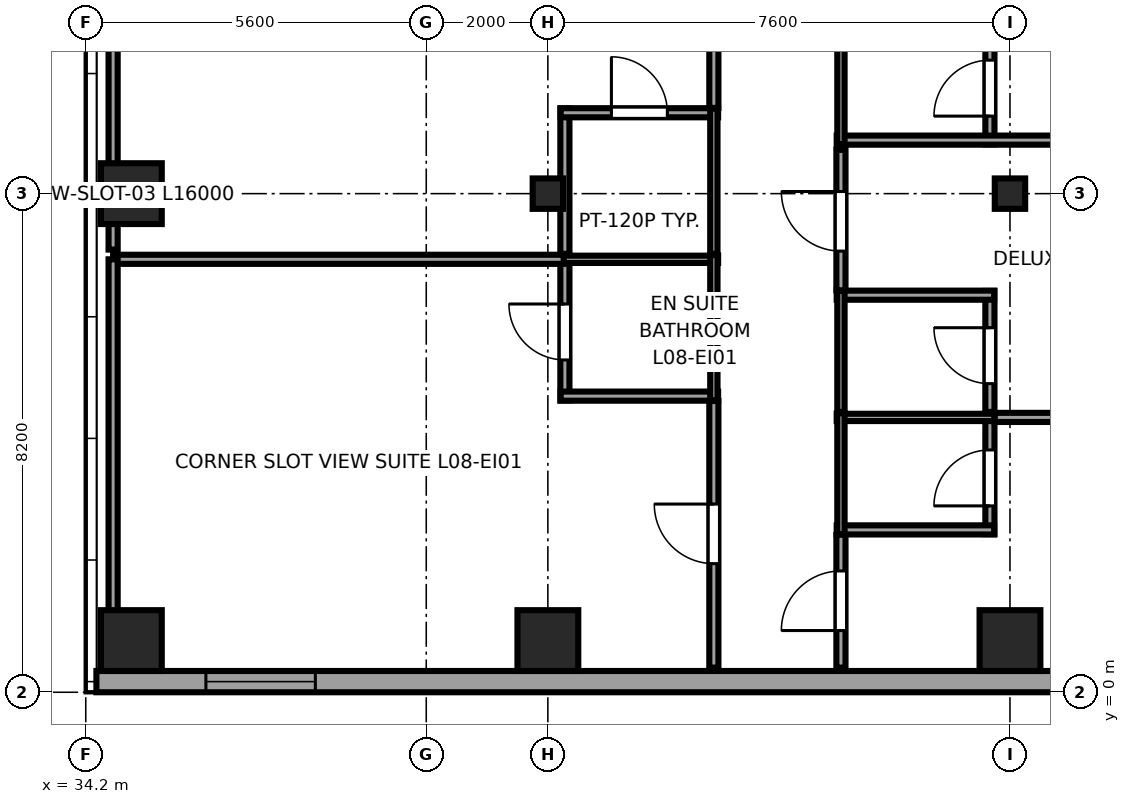
"""IFC4 building model, lengths in metres.
Left out: names, types, materials, properties, quantities, classifications, styles, units other than length and angle.
Written with IfcOpenShell. Run it as: python <this file> out.ifc"""

import sys

from ifc_helpers import new_model, si_unit, direction, frame, frame_2d, origin, origin_2d, place, context, subcontext, project, spatial, rectangle, i_section, extrude, source, transform, mapped, element, fill, save


model = new_model("IFC4")
c1 = context("Model", 3, precision=1e-05, world=origin(), true_north=direction((0.0, 1.0)))
c2 = subcontext(c1, "Body", "Model", "MODEL_VIEW")
j1 = project(units=[si_unit("LENGTHUNIT", "METRE"), si_unit("PLANEANGLEUNIT", "RADIAN")], contexts=[c1])
p1 = place(None, origin())
s1 = spatial("IfcSite", under=j1, at=p1, CompositionType="ELEMENT")
p2 = place(p1, origin())
s2 = spatial("IfcBuilding", under=s1, at=p2, CompositionType="ELEMENT")
p3 = place(p2, frame((0.0, 0.0, 39.1)))
s3 = spatial("IfcBuildingStorey", under=s2, at=p3, CompositionType="ELEMENT", Elevation=39.1)
m1 = source(origin(), c2, "Body", "SweptSolid", [
    extrude(rectangle(XDim=1.0, YDim=1.0, at=origin_2d()), origin(), (0.0, 0.0, 1.0), 3.55),
])
for number, where, z_axis, x_axis in (
    (1, (34.95, 0.85, 0.0), (0.0, 0.0, 1.0), (1.0, 0.0, 0.0)),
    (2, (34.95, 8.2, 0.0), (0.0, 0.0, 1.0), (1.0, 0.0, 0.0)),
    (3, (41.8, 0.85, 0.0), (0.0, 0.0, 1.0), (1.0, 0.0, 0.0)),
):
    element("IfcColumn", number, at=place(p3, frame(where, z_axis=z_axis, x_axis=x_axis)), inside=s3, PredefinedType="COLUMN", context=c2, shape_type="MappedRepresentation", body=[
        mapped(m1, transform((0.0, 0.0, 0.0), x_axis=(1.0, 0.0, 0.0), y_axis=(0.0, 1.0, 0.0), z_axis=(0.0, 0.0, 1.0), scale=1.0)),
    ])
m2 = source(origin(), c2, "Body", "SweptSolid", [
    extrude(i_section(OverallWidth=0.5, OverallDepth=0.5, WebThickness=0.028, FlangeThickness=0.045, at=origin_2d()), origin(), (0.0, 0.0, 1.0), 3.55),
])
p4 = place(p3, frame((41.8, 8.2, 0.0), z_axis=(0.0, 0.0, 1.0), x_axis=(1.0, 0.0, 0.0)))
e4 = element("IfcColumn", 4, at=p4, inside=s3, PredefinedType="COLUMN", context=c2, shape_type="MappedRepresentation", body=[
    mapped(m2, transform((0.0, 0.0, 0.0), x_axis=(1.0, 0.0, 0.0), y_axis=(0.0, 1.0, 0.0), z_axis=(0.0, 0.0, 1.0), scale=1.0)),
])
p5 = place(p3, frame((49.4, 0.85, 0.0), z_axis=(0.0, 0.0, 1.0), x_axis=(1.0, 0.0, 0.0)))
e5 = element("IfcColumn", 5, at=p5, inside=s3, PredefinedType="COLUMN", context=c2, shape_type="MappedRepresentation", body=[
    mapped(m1, transform((0.0, 0.0, 0.0), x_axis=(1.0, 0.0, 0.0), y_axis=(0.0, 1.0, 0.0), z_axis=(0.0, 0.0, 1.0), scale=1.0)),
])
p6 = place(p3, frame((49.4, 8.2, 0.0), z_axis=(0.0, 0.0, 1.0), x_axis=(1.0, 0.0, 0.0)))
e6 = element("IfcColumn", 6, at=p6, inside=s3, PredefinedType="COLUMN", context=c2, shape_type="MappedRepresentation", body=[
    mapped(m2, transform((0.0, 0.0, 0.0), x_axis=(1.0, 0.0, 0.0), y_axis=(0.0, 1.0, 0.0), z_axis=(0.0, 0.0, 1.0), scale=1.0)),
])
p7 = place(p3, frame((34.375, 0.175, 0.0), z_axis=(0.0, 0.0, 1.0), x_axis=(1.0, 0.0, 0.0)))
e7 = element("IfcWall", 7, at=p7, inside=s3, PredefinedType="SOLIDWALL", context=c2, shape_type="SweptSolid", body=[
    extrude(rectangle(XDim=18.008, YDim=0.35, at=frame_2d((9.004, 0.0))), origin(), (0.0, 0.0, 1.0), 3.37),
])
p8 = place(p7, frame((1.801, 0.0, 0.68)))
e8 = element("IfcOpeningElement", 8, at=p8, cuts=e7, PredefinedType="OPENING", context=c2, shape_type="SweptSolid", body=[
    extrude(rectangle(XDim=1.8, YDim=1.85, at=frame_2d((0.9, 0.925))), frame((0.0, 0.185, 0.0), z_axis=(0.0, -1.0, 0.0), x_axis=(1.0, 0.0, 0.0)), (0.0, 0.0, 1.0), 0.37),
])
p9 = place(p7, frame((15.725, 0.0, 0.62)))
e9 = element("IfcOpeningElement", 9, at=p9, cuts=e7, PredefinedType="OPENING", context=c2, shape_type="SweptSolid", body=[
    extrude(rectangle(XDim=1.5, YDim=1.55, at=frame_2d((0.75, 0.775))), frame((0.0, 0.185, 0.0), z_axis=(0.0, -1.0, 0.0), x_axis=(1.0, 0.0, 0.0)), (0.0, 0.0, 1.0), 0.37),
])
p10 = place(p3, frame((42.08, 4.8, 0.0), z_axis=(0.0, 0.0, 1.0), x_axis=(0.0, 1.0, 0.0)))
e10 = element("IfcWall", 10, at=p10, inside=s3, PredefinedType="PARTITIONING", context=c2, shape_type="SweptSolid", body=[
    extrude(rectangle(XDim=2.39, YDim=0.15, at=frame_2d((1.195, 0.0))), origin(), (0.0, 0.0, 1.0), 3.37),
])
p11 = place(p10, frame((0.665, 0.0, 0.0)))
e11 = element("IfcOpeningElement", 11, at=p11, cuts=e10, PredefinedType="OPENING", context=c2, shape_type="SweptSolid", body=[
    extrude(rectangle(XDim=0.92, YDim=2.01, at=frame_2d((0.46, 1.005))), frame((0.0, 0.085, 0.0), z_axis=(0.0, -1.0, 0.0), x_axis=(1.0, 0.0, 0.0)), (0.0, 0.0, 1.0), 0.17),
])
p12 = place(p3, frame((42.01, 4.87, 0.0), z_axis=(0.0, 0.0, 1.0), x_axis=(1.0, 0.0, 0.0)))
e12 = element("IfcWall", 12, at=p12, inside=s3, PredefinedType="PARTITIONING", context=c2, shape_type="SweptSolid", body=[
    extrude(rectangle(XDim=2.59, YDim=0.15, at=frame_2d((1.295, 0.0))), origin(), (0.0, 0.0, 1.0), 3.37),
])
p13 = place(p3, frame((42.01, 7.12, 0.0), z_axis=(0.0, 0.0, 1.0), x_axis=(1.0, 0.0, 0.0)))
e13 = element("IfcWall", 13, at=p13, inside=s3, PredefinedType="PLUMBINGWALL", context=c2, shape_type="SweptSolid", body=[
    extrude(rectangle(XDim=2.59, YDim=0.12, at=frame_2d((1.295, 0.0))), origin(), (0.0, 0.0, 1.0), 3.37),
])
p14 = place(p3, frame((44.53, 4.8, 0.0), z_axis=(0.0, 0.0, 1.0), x_axis=(0.0, 1.0, 0.0)))
e14 = element("IfcWall", 14, at=p14, inside=s3, PredefinedType="PLUMBINGWALL", context=c2, shape_type="SweptSolid", body=[
    extrude(rectangle(XDim=2.39, YDim=0.12, at=frame_2d((1.195, 0.0))), origin(), (0.0, 0.0, 1.0), 3.37),
])
p15 = place(p3, frame((42.08, 7.21, 0.0), z_axis=(0.0, 0.0, 1.0), x_axis=(0.0, 1.0, 0.0)))
e15 = element("IfcWall", 15, at=p15, inside=s3, PredefinedType="PARTITIONING", context=c2, shape_type="SweptSolid", body=[
    extrude(rectangle(XDim=2.39, YDim=0.15, at=frame_2d((1.195, 0.0))), origin(), (0.0, 0.0, 1.0), 3.37),
])
p16 = place(p3, frame((42.01, 9.53, 0.0), z_axis=(0.0, 0.0, 1.0), x_axis=(1.0, 0.0, 0.0)))
e16 = element("IfcWall", 16, at=p16, inside=s3, PredefinedType="PARTITIONING", context=c2, shape_type="SweptSolid", body=[
    extrude(rectangle(XDim=2.59, YDim=0.15, at=frame_2d((1.295, 0.0))), origin(), (0.0, 0.0, 1.0), 3.37),
])
p17 = place(p16, frame((0.835, 0.0, 0.0)))
e17 = element("IfcOpeningElement", 17, at=p17, cuts=e16, PredefinedType="OPENING", context=c2, shape_type="SweptSolid", body=[
    extrude(rectangle(XDim=0.92, YDim=2.01, at=frame_2d((0.46, 1.005))), frame((0.0, 0.085, 0.0), z_axis=(0.0, -1.0, 0.0), x_axis=(1.0, 0.0, 0.0)), (0.0, 0.0, 1.0), 0.17),
])
p18 = place(p3, frame((44.53, 7.21, 0.0), z_axis=(0.0, 0.0, 1.0), x_axis=(0.0, 1.0, 0.0)))
e18 = element("IfcWall", 18, at=p18, inside=s3, PredefinedType="PLUMBINGWALL", context=c2, shape_type="SweptSolid", body=[
    extrude(rectangle(XDim=2.39, YDim=0.12, at=frame_2d((1.195, 0.0))), origin(), (0.0, 0.0, 1.0), 3.37),
])
p19 = place(p3, frame((49.07, 2.6, 0.0), z_axis=(0.0, 0.0, 1.0), x_axis=(0.0, 1.0, 0.0)))
e19 = element("IfcWall", 19, at=p19, inside=s3, PredefinedType="PARTITIONING", context=c2, shape_type="SweptSolid", body=[
    extrude(rectangle(XDim=1.99, YDim=0.15, at=frame_2d((0.995, 0.0))), origin(), (0.0, 0.0, 1.0), 3.37),
])
p20 = place(p19, frame((0.465, 0.0, 0.0)))
e20 = element("IfcOpeningElement", 20, at=p20, cuts=e19, PredefinedType="OPENING", context=c2, shape_type="SweptSolid", body=[
    extrude(rectangle(XDim=0.92, YDim=2.01, at=frame_2d((0.46, 1.005))), frame((0.0, 0.085, 0.0), z_axis=(0.0, -1.0, 0.0), x_axis=(1.0, 0.0, 0.0)), (0.0, 0.0, 1.0), 0.17),
])
p21 = place(p3, frame((46.55, 2.67, 0.0), z_axis=(0.0, 0.0, 1.0), x_axis=(1.0, 0.0, 0.0)))
e21 = element("IfcWall", 21, at=p21, inside=s3, PredefinedType="PARTITIONING", context=c2, shape_type="SweptSolid", body=[
    extrude(rectangle(XDim=2.59, YDim=0.15, at=frame_2d((1.295, 0.0))), origin(), (0.0, 0.0, 1.0), 3.37),
])
p22 = place(p3, frame((46.55, 4.52, 0.0), z_axis=(0.0, 0.0, 1.0), x_axis=(1.0, 0.0, 0.0)))
e22 = element("IfcWall", 22, at=p22, inside=s3, PredefinedType="PLUMBINGWALL", context=c2, shape_type="SweptSolid", body=[
    extrude(rectangle(XDim=2.59, YDim=0.12, at=frame_2d((1.295, 0.0))), origin(), (0.0, 0.0, 1.0), 3.37),
])
p23 = place(p3, frame((46.62, 2.6, 0.0), z_axis=(0.0, 0.0, 1.0), x_axis=(0.0, 1.0, 0.0)))
e23 = element("IfcWall", 23, at=p23, inside=s3, PredefinedType="PLUMBINGWALL", context=c2, shape_type="SweptSolid", body=[
    extrude(rectangle(XDim=1.99, YDim=0.12, at=frame_2d((0.995, 0.0))), origin(), (0.0, 0.0, 1.0), 3.37),
])
p24 = place(p3, frame((49.07, 4.61, 0.0), z_axis=(0.0, 0.0, 1.0), x_axis=(0.0, 1.0, 0.0)))
e24 = element("IfcWall", 24, at=p24, inside=s3, PredefinedType="PARTITIONING", context=c2, shape_type="SweptSolid", body=[
    extrude(rectangle(XDim=1.99, YDim=0.15, at=frame_2d((0.995, 0.0))), origin(), (0.0, 0.0, 1.0), 3.37),
])
p25 = place(p24, frame((0.465, 0.0, 0.0)))
e25 = element("IfcOpeningElement", 25, at=p25, cuts=e24, PredefinedType="OPENING", context=c2, shape_type="SweptSolid", body=[
    extrude(rectangle(XDim=0.92, YDim=2.01, at=frame_2d((0.46, 1.005))), frame((0.0, 0.085, 0.0), z_axis=(0.0, -1.0, 0.0), x_axis=(1.0, 0.0, 0.0)), (0.0, 0.0, 1.0), 0.17),
])
p26 = place(p3, frame((46.55, 6.53, 0.0), z_axis=(0.0, 0.0, 1.0), x_axis=(1.0, 0.0, 0.0)))
e26 = element("IfcWall", 26, at=p26, inside=s3, PredefinedType="PARTITIONING", context=c2, shape_type="SweptSolid", body=[
    extrude(rectangle(XDim=2.59, YDim=0.15, at=frame_2d((1.295, 0.0))), origin(), (0.0, 0.0, 1.0), 3.37),
])
p27 = place(p3, frame((46.62, 4.61, 0.0), z_axis=(0.0, 0.0, 1.0), x_axis=(0.0, 1.0, 0.0)))
e27 = element("IfcWall", 27, at=p27, inside=s3, PredefinedType="PLUMBINGWALL", context=c2, shape_type="SweptSolid", body=[
    extrude(rectangle(XDim=1.99, YDim=0.12, at=frame_2d((0.995, 0.0))), origin(), (0.0, 0.0, 1.0), 3.37),
])
p28 = place(p3, frame((49.07, 9.01, 0.0), z_axis=(0.0, 0.0, 1.0), x_axis=(0.0, 1.0, 0.0)))
e28 = element("IfcWall", 28, at=p28, inside=s3, PredefinedType="PARTITIONING", context=c2, shape_type="SweptSolid", body=[
    extrude(rectangle(XDim=1.99, YDim=0.15, at=frame_2d((0.995, 0.0))), origin(), (0.0, 0.0, 1.0), 3.37),
])
p29 = place(p28, frame((0.465, 0.0, 0.0)))
e29 = element("IfcOpeningElement", 29, at=p29, cuts=e28, PredefinedType="OPENING", context=c2, shape_type="SweptSolid", body=[
    extrude(rectangle(XDim=0.92, YDim=2.01, at=frame_2d((0.46, 1.005))), frame((0.0, 0.085, 0.0), z_axis=(0.0, -1.0, 0.0), x_axis=(1.0, 0.0, 0.0)), (0.0, 0.0, 1.0), 0.17),
])
p30 = place(p3, frame((46.55, 9.08, 0.0), z_axis=(0.0, 0.0, 1.0), x_axis=(1.0, 0.0, 0.0)))
e30 = element("IfcWall", 30, at=p30, inside=s3, PredefinedType="PARTITIONING", context=c2, shape_type="SweptSolid", body=[
    extrude(rectangle(XDim=10.045, YDim=0.15, at=frame_2d((5.022, 0.0))), origin(), (0.0, 0.0, 1.0), 3.37),
])
p31 = place(p3, frame((46.62, 9.01, 0.0), z_axis=(0.0, 0.0, 1.0), x_axis=(0.0, 1.0, 0.0)))
e31 = element("IfcWall", 31, at=p31, inside=s3, PredefinedType="PLUMBINGWALL", context=c2, shape_type="SweptSolid", body=[
    extrude(rectangle(XDim=1.99, YDim=0.12, at=frame_2d((0.995, 0.0))), origin(), (0.0, 0.0, 1.0), 3.37),
])
p32 = place(p3, frame((44.53, 0.405, 0.0), z_axis=(0.0, 0.0, 1.0), x_axis=(0.0, 1.0, 0.0)))
e32 = element("IfcWall", 32, at=p32, inside=s3, PredefinedType="PARTITIONING", context=c2, shape_type="SweptSolid", body=[
    extrude(rectangle(XDim=4.385, YDim=0.15, at=frame_2d((2.192, 0.0))), origin(), (0.0, 0.0, 1.0), 3.37),
])
p33 = place(p32, frame((1.71, 0.0, 0.0)))
e33 = element("IfcOpeningElement", 33, at=p33, cuts=e32, PredefinedType="OPENING", context=c2, shape_type="SweptSolid", body=[
    extrude(rectangle(XDim=0.98, YDim=2.12, at=frame_2d((0.49, 1.06))), frame((0.0, 0.085, 0.0), z_axis=(0.0, -1.0, 0.0), x_axis=(1.0, 0.0, 0.0)), (0.0, 0.0, 1.0), 0.17),
])
p34 = place(p3, frame((34.65, 7.12, 0.0), z_axis=(0.0, 0.0, 1.0), x_axis=(1.0, 0.0, 0.0)))
e34 = element("IfcWall", 34, at=p34, inside=s3, PredefinedType="PARTITIONING", context=c2, shape_type="SweptSolid", body=[
    extrude(rectangle(XDim=7.41, YDim=0.15, at=frame_2d((3.705, 0.0))), origin(), (0.0, 0.0, 1.0), 3.37),
])
p35 = place(p3, frame((34.65, 0.405, 0.0), z_axis=(0.0, 0.0, 1.0), x_axis=(0.0, 1.0, 0.0)))
e35 = element("IfcWall", 35, at=p35, inside=s3, PredefinedType="PARTITIONING", context=c2, shape_type="SweptSolid", body=[
    extrude(rectangle(XDim=6.715, YDim=0.15, at=frame_2d((3.357, 0.0))), origin(), (0.0, 0.0, 1.0), 3.37),
])
p36 = place(p3, frame((44.53, 9.61, 0.0), z_axis=(0.0, 0.0, 1.0), x_axis=(0.0, 1.0, 0.0)))
e36 = element("IfcWall", 36, at=p36, inside=s3, PredefinedType="PARTITIONING", context=c2, shape_type="SweptSolid", body=[
    extrude(rectangle(XDim=4.51, YDim=0.15, at=frame_2d((2.255, 0.0))), origin(), (0.0, 0.0, 1.0), 3.37),
])
p37 = place(p36, frame((1.745, 0.0, 0.0)))
e37 = element("IfcOpeningElement", 37, at=p37, cuts=e36, PredefinedType="OPENING", context=c2, shape_type="SweptSolid", body=[
    extrude(rectangle(XDim=0.98, YDim=2.12, at=frame_2d((0.49, 1.06))), frame((0.0, 0.085, 0.0), z_axis=(0.0, -1.0, 0.0), x_axis=(1.0, 0.0, 0.0)), (0.0, 0.0, 1.0), 0.17),
])
p38 = place(p3, frame((34.65, 7.28, 0.0), z_axis=(0.0, 0.0, 1.0), x_axis=(0.0, 1.0, 0.0)))
e38 = element("IfcWall", 38, at=p38, inside=s3, PredefinedType="PARTITIONING", context=c2, shape_type="SweptSolid", body=[
    extrude(rectangle(XDim=6.84, YDim=0.15, at=frame_2d((3.42, 0.0))), origin(), (0.0, 0.0, 1.0), 3.37),
])
p39 = place(p3, frame((46.62, 0.405, 0.0), z_axis=(0.0, 0.0, 1.0), x_axis=(0.0, 1.0, 0.0)))
e39 = element("IfcWall", 39, at=p39, inside=s3, PredefinedType="PARTITIONING", context=c2, shape_type="SweptSolid", body=[
    extrude(rectangle(XDim=2.185, YDim=0.15, at=frame_2d((1.093, 0.0))), origin(), (0.0, 0.0, 1.0), 3.37),
])
p40 = place(p39, frame((0.61, 0.0, 0.0)))
e40 = element("IfcOpeningElement", 40, at=p40, cuts=e39, PredefinedType="OPENING", context=c2, shape_type="SweptSolid", body=[
    extrude(rectangle(XDim=0.98, YDim=2.12, at=frame_2d((0.49, 1.06))), frame((0.0, 0.085, 0.0), z_axis=(0.0, -1.0, 0.0), x_axis=(1.0, 0.0, 0.0)), (0.0, 0.0, 1.0), 0.17),
])
p41 = place(p3, frame((49.15, 4.52, 0.0), z_axis=(0.0, 0.0, 1.0), x_axis=(1.0, 0.0, 0.0)))
e41 = element("IfcWall", 41, at=p41, inside=s3, PredefinedType="PARTITIONING", context=c2, shape_type="SweptSolid", body=[
    extrude(rectangle(XDim=7.445, YDim=0.15, at=frame_2d((3.723, 0.0))), origin(), (0.0, 0.0, 1.0), 3.37),
])
p42 = place(p3, frame((46.62, 6.61, 0.0), z_axis=(0.0, 0.0, 1.0), x_axis=(0.0, 1.0, 0.0)))
e42 = element("IfcWall", 42, at=p42, inside=s3, PredefinedType="PARTITIONING", context=c2, shape_type="SweptSolid", body=[
    extrude(rectangle(XDim=2.31, YDim=0.15, at=frame_2d((1.155, 0.0))), origin(), (0.0, 0.0, 1.0), 3.37),
])
p43 = place(p42, frame((0.645, 0.0, 0.0)))
e43 = element("IfcOpeningElement", 43, at=p43, cuts=e42, PredefinedType="OPENING", context=c2, shape_type="SweptSolid", body=[
    extrude(rectangle(XDim=0.98, YDim=2.12, at=frame_2d((0.49, 1.06))), frame((0.0, 0.085, 0.0), z_axis=(0.0, -1.0, 0.0), x_axis=(1.0, 0.0, 0.0)), (0.0, 0.0, 1.0), 0.17),
])
m3 = source(origin(), c2, "Body", "SweptSolid", [
    extrude(rectangle(XDim=1.8, YDim=1.85, at=frame_2d((0.9, 0.925))), frame((0.0, 0.09, 0.0), z_axis=(0.0, -1.0, 0.0), x_axis=(1.0, 0.0, 0.0)), (0.0, 0.0, 1.0), 0.06),
])
p44 = place(p8, origin())
e44 = element("IfcWindow", 44, at=p44, inside=s3, PartitioningType="TRIPLE_PANEL_HORIZONTAL", PredefinedType="WINDOW", context=c2, shape_type="MappedRepresentation", body=[
    mapped(m3, transform((0.0, 0.0, 0.0), x_axis=(1.0, 0.0, 0.0), y_axis=(0.0, 1.0, 0.0), z_axis=(0.0, 0.0, 1.0), scale=1.0)),
])
fill(e8, e44)
m4 = source(origin(), c2, "Body", "SweptSolid", [
    extrude(rectangle(XDim=0.92, YDim=2.01, at=frame_2d((0.46, 1.005))), frame((0.0, 0.025, 0.0), z_axis=(0.0, -1.0, 0.0), x_axis=(1.0, 0.0, 0.0)), (0.0, 0.0, 1.0), 0.05),
])
p45 = place(p11, origin())
e45 = element("IfcDoor", 45, at=p45, inside=s3, OperationType="SINGLE_SWING_RIGHT", PredefinedType="DOOR", context=c2, shape_type="MappedRepresentation", body=[
    mapped(m4, transform((0.0, 0.0, 0.0), x_axis=(1.0, 0.0, 0.0), y_axis=(0.0, 1.0, 0.0), z_axis=(0.0, 0.0, 1.0), scale=1.0)),
])
fill(e11, e45)
p46 = place(p17, origin())
e46 = element("IfcDoor", 46, at=p46, inside=s3, OperationType="SINGLE_SWING_LEFT", PredefinedType="DOOR", context=c2, shape_type="MappedRepresentation", body=[
    mapped(m4, transform((0.0, 0.0, 0.0), x_axis=(1.0, 0.0, 0.0), y_axis=(0.0, 1.0, 0.0), z_axis=(0.0, 0.0, 1.0), scale=1.0)),
])
fill(e17, e46)
p47 = place(p20, origin())
e47 = element("IfcDoor", 47, at=p47, inside=s3, OperationType="SINGLE_SWING_LEFT", PredefinedType="DOOR", context=c2, shape_type="MappedRepresentation", body=[
    mapped(m4, transform((0.0, 0.0, 0.0), x_axis=(1.0, 0.0, 0.0), y_axis=(0.0, 1.0, 0.0), z_axis=(0.0, 0.0, 1.0), scale=1.0)),
])
fill(e20, e47)
p48 = place(p25, origin())
e48 = element("IfcDoor", 48, at=p48, inside=s3, OperationType="SINGLE_SWING_RIGHT", PredefinedType="DOOR", context=c2, shape_type="MappedRepresentation", body=[
    mapped(m4, transform((0.0, 0.0, 0.0), x_axis=(1.0, 0.0, 0.0), y_axis=(0.0, 1.0, 0.0), z_axis=(0.0, 0.0, 1.0), scale=1.0)),
])
fill(e25, e48)
p49 = place(p29, origin())
e49 = element("IfcDoor", 49, at=p49, inside=s3, OperationType="SINGLE_SWING_LEFT", PredefinedType="DOOR", context=c2, shape_type="MappedRepresentation", body=[
    mapped(m4, transform((0.0, 0.0, 0.0), x_axis=(1.0, 0.0, 0.0), y_axis=(0.0, 1.0, 0.0), z_axis=(0.0, 0.0, 1.0), scale=1.0)),
])
fill(e29, e49)
m5 = source(origin(), c2, "Body", "SweptSolid", [
    extrude(rectangle(XDim=0.98, YDim=2.12, at=frame_2d((0.49, 1.06))), frame((0.0, 0.025, 0.0), z_axis=(0.0, -1.0, 0.0), x_axis=(1.0, 0.0, 0.0)), (0.0, 0.0, 1.0), 0.05),
])
p50 = place(p33, origin())
e50 = element("IfcDoor", 50, at=p50, inside=s3, OperationType="SINGLE_SWING_RIGHT", PredefinedType="DOOR", context=c2, shape_type="MappedRepresentation", body=[
    mapped(m5, transform((0.0, 0.0, 0.0), x_axis=(1.0, 0.0, 0.0), y_axis=(0.0, 1.0, 0.0), z_axis=(0.0, 0.0, 1.0), scale=1.0)),
])
fill(e33, e50)
p51 = place(p40, origin())
e51 = element("IfcDoor", 51, at=p51, inside=s3, OperationType="SINGLE_SWING_LEFT", PredefinedType="DOOR", context=c2, shape_type="MappedRepresentation", body=[
    mapped(m5, transform((0.0, 0.0, 0.0), x_axis=(1.0, 0.0, 0.0), y_axis=(0.0, 1.0, 0.0), z_axis=(0.0, 0.0, 1.0), scale=1.0)),
])
fill(e40, e51)
p52 = place(p43, origin())
e52 = element("IfcDoor", 52, at=p52, inside=s3, OperationType="SINGLE_SWING_RIGHT", PredefinedType="DOOR", context=c2, shape_type="MappedRepresentation", body=[
    mapped(m5, transform((0.0, 0.0, 0.0), x_axis=(1.0, 0.0, 0.0), y_axis=(0.0, 1.0, 0.0), z_axis=(0.0, 0.0, 1.0), scale=1.0)),
])
fill(e43, e52)
save(model, sys.argv[1])
